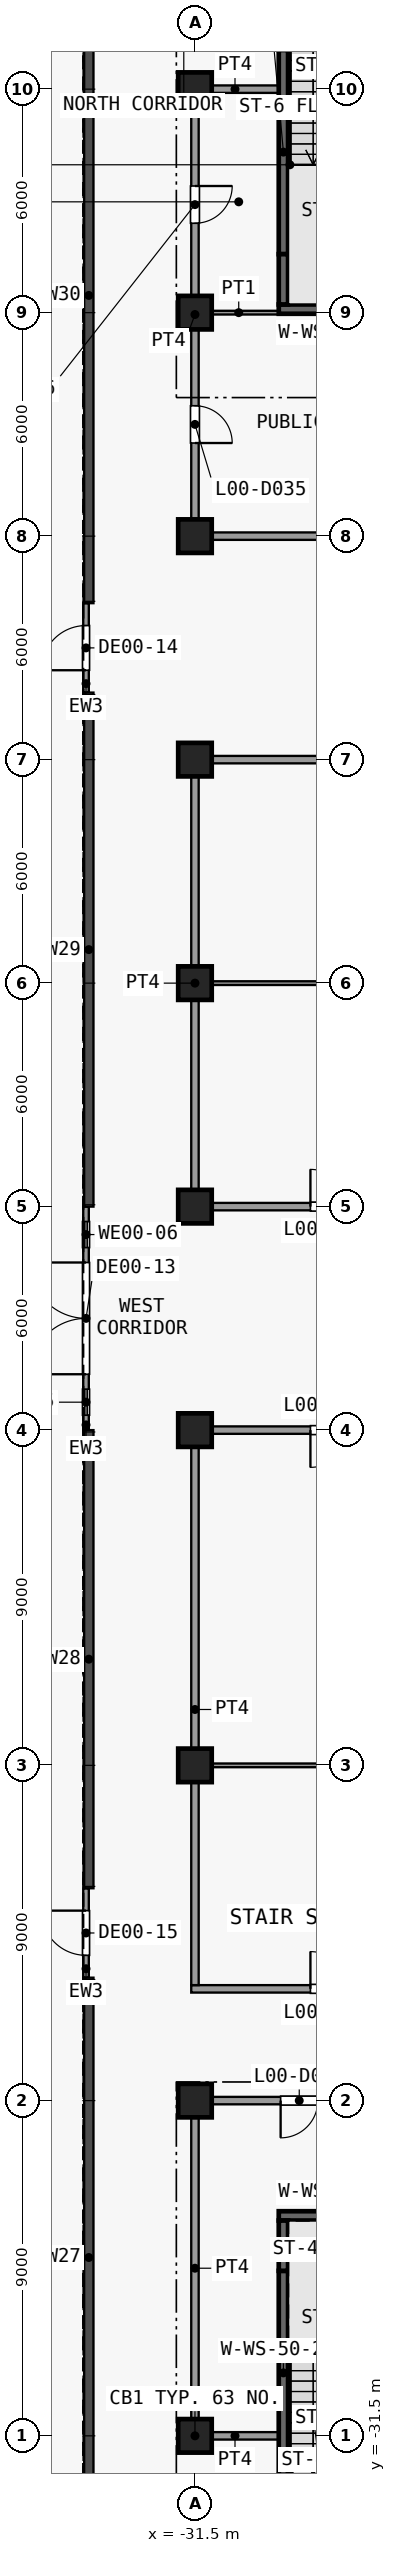
"""IFC4 building model, lengths in metres.
Left out: names, types, materials, properties, quantities, classifications, styles, units other than length and angle.
Written with IfcOpenShell. Run it as: python <this file> out.ifc"""

import sys

from ifc_helpers import new_model, si_unit, direction, frame, frame_2d, origin, origin_2d, place, context, subcontext, project, spatial, rectangle, extrude, element, fill, save


model = new_model("IFC4")
c1 = context("Model", 3, precision=1e-05, world=origin(), true_north=direction((0.0, 1.0)))
c2 = subcontext(c1, "Body", "Model", "MODEL_VIEW")
j1 = project(units=[si_unit("LENGTHUNIT", "METRE"), si_unit("PLANEANGLEUNIT", "RADIAN")], contexts=[c1])
p1 = place(None, origin())
s1 = spatial("IfcSite", under=j1, at=p1, CompositionType="ELEMENT")
p2 = place(p1, origin())
s2 = spatial("IfcBuilding", under=s1, at=p2, CompositionType="ELEMENT")
p3 = place(p2, origin())
s3 = spatial("IfcBuildingStorey", under=s2, at=p3, CompositionType="ELEMENT", Elevation=0.0)
for number, where, z_axis, x_axis in (
    (1, (-31.5, -31.5, 0.0), (0.0, 0.0, 1.0), (1.0, 0.0, 0.0)),
    (2, (-31.5, -22.5, 0.0), (0.0, 0.0, 1.0), (1.0, 0.0, 0.0)),
    (3, (-31.5, -13.5, 0.0), (0.0, 0.0, 1.0), (1.0, 0.0, 0.0)),
    (4, (-31.5, -4.5, 0.0), (0.0, 0.0, 1.0), (1.0, 0.0, 0.0)),
    (5, (-31.5, 1.5, 0.0), (0.0, 0.0, 1.0), (1.0, 0.0, 0.0)),
    (6, (-31.5, 7.5, 0.0), (0.0, 0.0, 1.0), (1.0, 0.0, 0.0)),
    (7, (-31.5, 13.5, 0.0), (0.0, 0.0, 1.0), (1.0, 0.0, 0.0)),
    (8, (-31.5, 19.5, 0.0), (0.0, 0.0, 1.0), (1.0, 0.0, 0.0)),
    (9, (-31.5, 25.5, 0.0), (0.0, 0.0, 1.0), (1.0, 0.0, 0.0)),
    (10, (-31.5, 31.5, 0.0), (0.0, 0.0, 1.0), (1.0, 0.0, 0.0)),
):
    element("IfcColumn", number, at=place(p3, frame(where, z_axis=z_axis, x_axis=x_axis)), inside=s3, PredefinedType="COLUMN", context=c2, shape_type="SweptSolid", body=[
        extrude(rectangle(XDim=0.9, YDim=0.9, at=origin_2d()), origin(), (0.0, 0.0, 1.0), 8.0),
    ])
p4 = place(p3, frame((-34.425, -4.5, 0.0), z_axis=(0.0, 0.0, 1.0), x_axis=(0.0, 1.0, 0.0)))
e11 = element("IfcWall", 11, at=p4, inside=s3, PredefinedType="SOLIDWALL", context=c2, shape_type="SweptSolid", body=[
    extrude(rectangle(XDim=6.0, YDim=0.15, at=frame_2d((3.0, 0.0))), origin(), (0.0, 0.0, 1.0), 7.65),
])
p5 = place(p4, frame((1.5, 0.0, 0.0)))
e12 = element("IfcOpeningElement", 12, at=p5, cuts=e11, PredefinedType="OPENING", context=c2, shape_type="SweptSolid", body=[
    extrude(rectangle(XDim=3.0, YDim=3.6, at=frame_2d((1.5, 1.8))), frame((0.0, 0.085, 0.0), z_axis=(0.0, -1.0, 0.0), x_axis=(1.0, 0.0, 0.0)), (0.0, 0.0, 1.0), 0.17),
])
p6 = place(p4, frame((0.4, 0.0, 0.0)))
e13 = element("IfcOpeningElement", 13, at=p6, cuts=e11, PredefinedType="OPENING", context=c2, shape_type="SweptSolid", body=[
    extrude(rectangle(XDim=0.7, YDim=5.0, at=frame_2d((0.35, 2.5))), frame((0.0, 0.085, 0.0), z_axis=(0.0, -1.0, 0.0), x_axis=(1.0, 0.0, 0.0)), (0.0, 0.0, 1.0), 0.17),
])
p7 = place(p4, frame((4.9, 0.0, 0.0)))
e14 = element("IfcOpeningElement", 14, at=p7, cuts=e11, PredefinedType="OPENING", context=c2, shape_type="SweptSolid", body=[
    extrude(rectangle(XDim=0.7, YDim=5.0, at=frame_2d((0.35, 2.5))), frame((0.0, 0.085, 0.0), z_axis=(0.0, -1.0, 0.0), x_axis=(1.0, 0.0, 0.0)), (0.0, 0.0, 1.0), 0.17),
])
p8 = place(p3, frame((-34.425, 15.3, 0.0), z_axis=(0.0, 0.0, 1.0), x_axis=(0.0, 1.0, 0.0)))
e15 = element("IfcWall", 15, at=p8, inside=s3, PredefinedType="SOLIDWALL", context=c2, shape_type="SweptSolid", body=[
    extrude(rectangle(XDim=2.4, YDim=0.15, at=frame_2d((1.2, 0.0))), origin(), (0.0, 0.0, 1.0), 7.65),
])
p9 = place(p8, frame((0.6, 0.0, 0.0)))
e16 = element("IfcOpeningElement", 16, at=p9, cuts=e15, PredefinedType="OPENING", context=c2, shape_type="SweptSolid", body=[
    extrude(rectangle(XDim=1.2, YDim=2.4, at=frame_2d((0.6, 1.2))), frame((0.0, 0.085, 0.0), z_axis=(0.0, -1.0, 0.0), x_axis=(1.0, 0.0, 0.0)), (0.0, 0.0, 1.0), 0.17),
])
p10 = place(p3, frame((-34.425, -19.2, 0.0), z_axis=(0.0, 0.0, 1.0), x_axis=(0.0, 1.0, 0.0)))
e17 = element("IfcWall", 17, at=p10, inside=s3, PredefinedType="SOLIDWALL", context=c2, shape_type="SweptSolid", body=[
    extrude(rectangle(XDim=2.4, YDim=0.15, at=frame_2d((1.2, 0.0))), origin(), (0.0, 0.0, 1.0), 7.65),
])
p11 = place(p10, frame((0.6, 0.0, 0.0)))
e18 = element("IfcOpeningElement", 18, at=p11, cuts=e17, PredefinedType="OPENING", context=c2, shape_type="SweptSolid", body=[
    extrude(rectangle(XDim=1.2, YDim=2.4, at=frame_2d((0.6, 1.2))), frame((0.0, 0.085, 0.0), z_axis=(0.0, -1.0, 0.0), x_axis=(1.0, 0.0, 0.0)), (0.0, 0.0, 1.0), 0.17),
])
p12 = place(p3, frame((-29.125, -32.55, 0.0), z_axis=(0.0, 0.0, 1.0), x_axis=(0.0, 1.0, 0.0)))
e19 = element("IfcWall", 19, at=p12, inside=s3, PredefinedType="SHEAR", context=c2, shape_type="SweptSolid", body=[
    extrude(rectangle(XDim=5.48, YDim=0.25, at=frame_2d((2.74, 0.0))), origin(), (0.0, 0.0, 1.0), 7.65),
])
p13 = place(p3, frame((-29.125, -27.07, 0.0), z_axis=(0.0, 0.0, 1.0), x_axis=(0.0, 1.0, 0.0)))
e20 = element("IfcWall", 20, at=p13, inside=s3, PredefinedType="SHEAR", context=c2, shape_type="SweptSolid", body=[
    extrude(rectangle(XDim=1.35, YDim=0.25, at=frame_2d((0.675, 0.0))), origin(), (0.0, 0.0, 1.0), 7.65),
])
p14 = place(p3, frame((-29.25, -25.595, 0.0), z_axis=(0.0, 0.0, 1.0), x_axis=(1.0, 0.0, 0.0)))
e21 = element("IfcWall", 21, at=p14, inside=s3, PredefinedType="SHEAR", context=c2, shape_type="SweptSolid", body=[
    extrude(rectangle(XDim=3.35, YDim=0.25, at=frame_2d((1.675, 0.0))), origin(), (0.0, 0.0, 1.0), 7.65),
])
p15 = place(p3, frame((-29.125, 27.07, 0.0), z_axis=(0.0, 0.0, 1.0), x_axis=(0.0, 1.0, 0.0)))
e22 = element("IfcWall", 22, at=p15, inside=s3, PredefinedType="SHEAR", context=c2, shape_type="SweptSolid", body=[
    extrude(rectangle(XDim=5.48, YDim=0.25, at=frame_2d((2.74, 0.0))), origin(), (0.0, 0.0, 1.0), 7.65),
])
p16 = place(p3, frame((-29.125, 25.72, 0.0), z_axis=(0.0, 0.0, 1.0), x_axis=(0.0, 1.0, 0.0)))
e23 = element("IfcWall", 23, at=p16, inside=s3, PredefinedType="SHEAR", context=c2, shape_type="SweptSolid", body=[
    extrude(rectangle(XDim=1.35, YDim=0.25, at=frame_2d((0.675, 0.0))), origin(), (0.0, 0.0, 1.0), 7.65),
])
p17 = place(p3, frame((-29.25, 25.595, 0.0), z_axis=(0.0, 0.0, 1.0), x_axis=(1.0, 0.0, 0.0)))
e24 = element("IfcWall", 24, at=p17, inside=s3, PredefinedType="SHEAR", context=c2, shape_type="SweptSolid", body=[
    extrude(rectangle(XDim=3.35, YDim=0.25, at=frame_2d((1.675, 0.0))), origin(), (0.0, 0.0, 1.0), 7.65),
])
p18 = place(p3, frame((-31.6, -31.5, 0.0), z_axis=(0.0, 0.0, 1.0), x_axis=(1.0, 0.0, 0.0)))
e25 = element("IfcWall", 25, at=p18, inside=s3, PredefinedType="PARTITIONING", context=c2, shape_type="SweptSolid", body=[
    extrude(rectangle(XDim=2.35, YDim=0.2, at=frame_2d((1.175, 0.0))), origin(), (0.0, 0.0, 1.0), 7.65),
])
p19 = place(p3, frame((-31.6, -22.5, 0.0), z_axis=(0.0, 0.0, 1.0), x_axis=(1.0, 0.0, 0.0)))
e26 = element("IfcWall", 26, at=p19, inside=s3, PredefinedType="PARTITIONING", context=c2, shape_type="SweptSolid", body=[
    extrude(rectangle(XDim=14.2, YDim=0.2, at=frame_2d((7.1, 0.0))), origin(), (0.0, 0.0, 1.0), 7.65),
])
p20 = place(p19, frame((2.4, 0.0, 0.0)))
e27 = element("IfcOpeningElement", 27, at=p20, cuts=e26, PredefinedType="OPENING", context=c2, shape_type="SweptSolid", body=[
    extrude(rectangle(XDim=1.0, YDim=2.1, at=frame_2d((0.5, 1.05))), frame((0.0, 0.11, 0.0), z_axis=(0.0, -1.0, 0.0), x_axis=(1.0, 0.0, 0.0)), (0.0, 0.0, 1.0), 0.22),
])
p21 = place(p19, frame((10.8, 0.0, 0.0)))
e28 = element("IfcOpeningElement", 28, at=p21, cuts=e26, PredefinedType="OPENING", context=c2, shape_type="SweptSolid", body=[
    extrude(rectangle(XDim=1.0, YDim=2.1, at=frame_2d((0.5, 1.05))), frame((0.0, 0.11, 0.0), z_axis=(0.0, -1.0, 0.0), x_axis=(1.0, 0.0, 0.0)), (0.0, 0.0, 1.0), 0.22),
])
p22 = place(p3, frame((-31.6, -19.5, 0.0), z_axis=(0.0, 0.0, 1.0), x_axis=(1.0, 0.0, 0.0)))
e29 = element("IfcWall", 29, at=p22, inside=s3, PredefinedType="PARTITIONING", context=c2, shape_type="SweptSolid", body=[
    extrude(rectangle(XDim=18.1, YDim=0.2, at=frame_2d((9.05, 0.0))), origin(), (0.0, 0.0, 1.0), 7.65),
])
p23 = place(p22, frame((3.2, 0.0, 0.0)))
e30 = element("IfcOpeningElement", 30, at=p23, cuts=e29, PredefinedType="OPENING", context=c2, shape_type="SweptSolid", body=[
    extrude(rectangle(XDim=1.0, YDim=2.1, at=frame_2d((0.5, 1.05))), frame((0.0, 0.11, 0.0), z_axis=(0.0, -1.0, 0.0), x_axis=(1.0, 0.0, 0.0)), (0.0, 0.0, 1.0), 0.22),
])
p24 = place(p22, frame((14.0, 0.0, 0.0)))
e31 = element("IfcOpeningElement", 31, at=p24, cuts=e29, PredefinedType="OPENING", context=c2, shape_type="SweptSolid", body=[
    extrude(rectangle(XDim=1.0, YDim=2.1, at=frame_2d((0.5, 1.05))), frame((0.0, 0.11, 0.0), z_axis=(0.0, -1.0, 0.0), x_axis=(1.0, 0.0, 0.0)), (0.0, 0.0, 1.0), 0.22),
])
p25 = place(p3, frame((-31.4, -13.5, 0.0), z_axis=(0.0, 0.0, 1.0), x_axis=(1.0, 0.0, 0.0)))
e32 = element("IfcWall", 32, at=p25, inside=s3, PredefinedType="PARTITIONING", context=c2, shape_type="SweptSolid", body=[
    extrude(rectangle(XDim=17.9, YDim=0.1, at=frame_2d((8.95, 0.0))), origin(), (0.0, 0.0, 1.0), 7.65),
])
p26 = place(p3, frame((-31.6, -4.5, 0.0), z_axis=(0.0, 0.0, 1.0), x_axis=(1.0, 0.0, 0.0)))
e33 = element("IfcWall", 33, at=p26, inside=s3, PredefinedType="PARTITIONING", context=c2, shape_type="SweptSolid", body=[
    extrude(rectangle(XDim=18.2, YDim=0.2, at=frame_2d((9.1, 0.0))), origin(), (0.0, 0.0, 1.0), 7.65),
])
p27 = place(p26, frame((3.2, 0.0, 0.0)))
e34 = element("IfcOpeningElement", 34, at=p27, cuts=e33, PredefinedType="OPENING", context=c2, shape_type="SweptSolid", body=[
    extrude(rectangle(XDim=1.0, YDim=2.1, at=frame_2d((0.5, 1.05))), frame((0.0, 0.11, 0.0), z_axis=(0.0, -1.0, 0.0), x_axis=(1.0, 0.0, 0.0)), (0.0, 0.0, 1.0), 0.22),
])
p28 = place(p26, frame((13.2, 0.0, 0.0)))
e35 = element("IfcOpeningElement", 35, at=p28, cuts=e33, PredefinedType="OPENING", context=c2, shape_type="SweptSolid", body=[
    extrude(rectangle(XDim=1.0, YDim=2.1, at=frame_2d((0.5, 1.05))), frame((0.0, 0.11, 0.0), z_axis=(0.0, -1.0, 0.0), x_axis=(1.0, 0.0, 0.0)), (0.0, 0.0, 1.0), 0.22),
])
p29 = place(p3, frame((-31.6, 1.5, 0.0), z_axis=(0.0, 0.0, 1.0), x_axis=(1.0, 0.0, 0.0)))
e36 = element("IfcWall", 36, at=p29, inside=s3, PredefinedType="PARTITIONING", context=c2, shape_type="SweptSolid", body=[
    extrude(rectangle(XDim=36.1, YDim=0.2, at=frame_2d((18.05, 0.0))), origin(), (0.0, 0.0, 1.0), 7.65),
])
p30 = place(p29, frame((3.2, 0.0, 0.0)))
e37 = element("IfcOpeningElement", 37, at=p30, cuts=e36, PredefinedType="OPENING", context=c2, shape_type="SweptSolid", body=[
    extrude(rectangle(XDim=1.0, YDim=2.1, at=frame_2d((0.5, 1.05))), frame((0.0, 0.11, 0.0), z_axis=(0.0, -1.0, 0.0), x_axis=(1.0, 0.0, 0.0)), (0.0, 0.0, 1.0), 0.22),
])
p31 = place(p29, frame((13.2, 0.0, 0.0)))
e38 = element("IfcOpeningElement", 38, at=p31, cuts=e36, PredefinedType="OPENING", context=c2, shape_type="SweptSolid", body=[
    extrude(rectangle(XDim=1.0, YDim=2.1, at=frame_2d((0.5, 1.05))), frame((0.0, 0.11, 0.0), z_axis=(0.0, -1.0, 0.0), x_axis=(1.0, 0.0, 0.0)), (0.0, 0.0, 1.0), 0.22),
])
p32 = place(p3, frame((-31.4, 7.5, 0.0), z_axis=(0.0, 0.0, 1.0), x_axis=(1.0, 0.0, 0.0)))
e39 = element("IfcWall", 39, at=p32, inside=s3, PredefinedType="PARTITIONING", context=c2, shape_type="SweptSolid", body=[
    extrude(rectangle(XDim=35.9, YDim=0.1, at=frame_2d((17.95, 0.0))), origin(), (0.0, 0.0, 1.0), 7.65),
])
p33 = place(p3, frame((-31.6, 13.5, 0.0), z_axis=(0.0, 0.0, 1.0), x_axis=(1.0, 0.0, 0.0)))
e40 = element("IfcWall", 40, at=p33, inside=s3, PredefinedType="PARTITIONING", context=c2, shape_type="SweptSolid", body=[
    extrude(rectangle(XDim=54.75, YDim=0.2, at=frame_2d((27.375, 0.0))), origin(), (0.0, 0.0, 1.0), 7.65),
])
p34 = place(p33, frame((7.2, 0.0, 0.0)))
e41 = element("IfcOpeningElement", 41, at=p34, cuts=e40, PredefinedType="OPENING", context=c2, shape_type="SweptSolid", body=[
    extrude(rectangle(XDim=1.0, YDim=2.1, at=frame_2d((0.5, 1.05))), frame((0.0, 0.11, 0.0), z_axis=(0.0, -1.0, 0.0), x_axis=(1.0, 0.0, 0.0)), (0.0, 0.0, 1.0), 0.22),
])
p35 = place(p33, frame((34.2, 0.0, 0.0)))
e42 = element("IfcOpeningElement", 42, at=p35, cuts=e40, PredefinedType="OPENING", context=c2, shape_type="SweptSolid", body=[
    extrude(rectangle(XDim=1.0, YDim=2.1, at=frame_2d((0.5, 1.05))), frame((0.0, 0.11, 0.0), z_axis=(0.0, -1.0, 0.0), x_axis=(1.0, 0.0, 0.0)), (0.0, 0.0, 1.0), 0.22),
])
p36 = place(p33, frame((45.3, 0.0, 0.0)))
e43 = element("IfcOpeningElement", 43, at=p36, cuts=e40, PredefinedType="OPENING", context=c2, shape_type="SweptSolid", body=[
    extrude(rectangle(XDim=1.0, YDim=2.1, at=frame_2d((0.5, 1.05))), frame((0.0, 0.11, 0.0), z_axis=(0.0, -1.0, 0.0), x_axis=(1.0, 0.0, 0.0)), (0.0, 0.0, 1.0), 0.22),
])
p37 = place(p33, frame((52.0, 0.0, 0.0)))
e44 = element("IfcOpeningElement", 44, at=p37, cuts=e40, PredefinedType="OPENING", context=c2, shape_type="SweptSolid", body=[
    extrude(rectangle(XDim=1.0, YDim=2.1, at=frame_2d((0.5, 1.05))), frame((0.0, 0.11, 0.0), z_axis=(0.0, -1.0, 0.0), x_axis=(1.0, 0.0, 0.0)), (0.0, 0.0, 1.0), 0.22),
])
p38 = place(p3, frame((-31.6, 19.5, 0.0), z_axis=(0.0, 0.0, 1.0), x_axis=(1.0, 0.0, 0.0)))
e45 = element("IfcWall", 45, at=p38, inside=s3, PredefinedType="PARTITIONING", context=c2, shape_type="SweptSolid", body=[
    extrude(rectangle(XDim=54.75, YDim=0.2, at=frame_2d((27.375, 0.0))), origin(), (0.0, 0.0, 1.0), 7.65),
])
p39 = place(p38, frame((7.2, 0.0, 0.0)))
e46 = element("IfcOpeningElement", 46, at=p39, cuts=e45, PredefinedType="OPENING", context=c2, shape_type="SweptSolid", body=[
    extrude(rectangle(XDim=1.0, YDim=2.1, at=frame_2d((0.5, 1.05))), frame((0.0, 0.11, 0.0), z_axis=(0.0, -1.0, 0.0), x_axis=(1.0, 0.0, 0.0)), (0.0, 0.0, 1.0), 0.22),
])
p40 = place(p38, frame((16.0, 0.0, 0.0)))
e47 = element("IfcOpeningElement", 47, at=p40, cuts=e45, PredefinedType="OPENING", context=c2, shape_type="SweptSolid", body=[
    extrude(rectangle(XDim=1.0, YDim=2.1, at=frame_2d((0.5, 1.05))), frame((0.0, 0.11, 0.0), z_axis=(0.0, -1.0, 0.0), x_axis=(1.0, 0.0, 0.0)), (0.0, 0.0, 1.0), 0.22),
])
p41 = place(p38, frame((32.5, 0.0, 0.0)))
e48 = element("IfcOpeningElement", 48, at=p41, cuts=e45, PredefinedType="OPENING", context=c2, shape_type="SweptSolid", body=[
    extrude(rectangle(XDim=1.0, YDim=2.1, at=frame_2d((0.5, 1.05))), frame((0.0, 0.11, 0.0), z_axis=(0.0, -1.0, 0.0), x_axis=(1.0, 0.0, 0.0)), (0.0, 0.0, 1.0), 0.22),
])
p42 = place(p38, frame((46.2, 0.0, 0.0)))
e49 = element("IfcOpeningElement", 49, at=p42, cuts=e45, PredefinedType="OPENING", context=c2, shape_type="SweptSolid", body=[
    extrude(rectangle(XDim=1.0, YDim=2.1, at=frame_2d((0.5, 1.05))), frame((0.0, 0.11, 0.0), z_axis=(0.0, -1.0, 0.0), x_axis=(1.0, 0.0, 0.0)), (0.0, 0.0, 1.0), 0.22),
])
p43 = place(p3, frame((-31.4, 25.5, 0.0), z_axis=(0.0, 0.0, 1.0), x_axis=(1.0, 0.0, 0.0)))
e50 = element("IfcWall", 50, at=p43, inside=s3, PredefinedType="PARTITIONING", context=c2, shape_type="SweptSolid", body=[
    extrude(rectangle(XDim=2.15, YDim=0.1, at=frame_2d((1.075, 0.0))), origin(), (0.0, 0.0, 1.0), 7.65),
])
p44 = place(p3, frame((-31.6, 31.5, 0.0), z_axis=(0.0, 0.0, 1.0), x_axis=(1.0, 0.0, 0.0)))
e51 = element("IfcWall", 51, at=p44, inside=s3, PredefinedType="PARTITIONING", context=c2, shape_type="SweptSolid", body=[
    extrude(rectangle(XDim=2.35, YDim=0.2, at=frame_2d((1.175, 0.0))), origin(), (0.0, 0.0, 1.0), 7.65),
])
p45 = place(p3, frame((-31.5, -31.4, 0.0), z_axis=(0.0, 0.0, 1.0), x_axis=(0.0, 1.0, 0.0)))
e52 = element("IfcWall", 52, at=p45, inside=s3, PredefinedType="PARTITIONING", context=c2, shape_type="SweptSolid", body=[
    extrude(rectangle(XDim=8.8, YDim=0.2, at=frame_2d((4.4, 0.0))), origin(), (0.0, 0.0, 1.0), 7.65),
])
p46 = place(p3, frame((-31.5, -19.4, 0.0), z_axis=(0.0, 0.0, 1.0), x_axis=(0.0, 1.0, 0.0)))
e53 = element("IfcWall", 53, at=p46, inside=s3, PredefinedType="PARTITIONING", context=c2, shape_type="SweptSolid", body=[
    extrude(rectangle(XDim=14.8, YDim=0.2, at=frame_2d((7.4, 0.0))), origin(), (0.0, 0.0, 1.0), 7.65),
])
p47 = place(p3, frame((-31.5, 1.6, 0.0), z_axis=(0.0, 0.0, 1.0), x_axis=(0.0, 1.0, 0.0)))
e54 = element("IfcWall", 54, at=p47, inside=s3, PredefinedType="PARTITIONING", context=c2, shape_type="SweptSolid", body=[
    extrude(rectangle(XDim=11.8, YDim=0.2, at=frame_2d((5.9, 0.0))), origin(), (0.0, 0.0, 1.0), 7.65),
])
p48 = place(p3, frame((-31.5, 19.6, 0.0), z_axis=(0.0, 0.0, 1.0), x_axis=(0.0, 1.0, 0.0)))
e55 = element("IfcWall", 55, at=p48, inside=s3, PredefinedType="PARTITIONING", context=c2, shape_type="SweptSolid", body=[
    extrude(rectangle(XDim=11.8, YDim=0.2, at=frame_2d((5.9, 0.0))), origin(), (0.0, 0.0, 1.0), 7.65),
])
p49 = place(p48, frame((2.4, 0.0, 0.0)))
e56 = element("IfcOpeningElement", 56, at=p49, cuts=e55, PredefinedType="OPENING", context=c2, shape_type="SweptSolid", body=[
    extrude(rectangle(XDim=1.0, YDim=2.1, at=frame_2d((0.5, 1.05))), frame((0.0, 0.11, 0.0), z_axis=(0.0, -1.0, 0.0), x_axis=(1.0, 0.0, 0.0)), (0.0, 0.0, 1.0), 0.22),
])
p50 = place(p48, frame((8.3, 0.0, 0.0)))
e57 = element("IfcOpeningElement", 57, at=p50, cuts=e55, PredefinedType="OPENING", context=c2, shape_type="SweptSolid", body=[
    extrude(rectangle(XDim=1.0, YDim=2.1, at=frame_2d((0.5, 1.05))), frame((0.0, 0.11, 0.0), z_axis=(0.0, -1.0, 0.0), x_axis=(1.0, 0.0, 0.0)), (0.0, 0.0, 1.0), 0.22),
])
p51 = place(p5, origin())
e58 = element("IfcDoor", 58, at=p51, inside=s3, OperationType="DOUBLE_DOOR_SINGLE_SWING", PredefinedType="DOOR", context=c2, shape_type="SweptSolid", body=[
    extrude(rectangle(XDim=3.0, YDim=3.6, at=frame_2d((1.5, 1.8))), frame((0.0, 0.025, 0.0), z_axis=(0.0, -1.0, 0.0), x_axis=(1.0, 0.0, 0.0)), (0.0, 0.0, 1.0), 0.05),
])
fill(e12, e58)
p52 = place(p6, origin())
e59 = element("IfcWindow", 59, at=p52, inside=s3, PartitioningType="SINGLE_PANEL", PredefinedType="WINDOW", context=c2, shape_type="SweptSolid", body=[
    extrude(rectangle(XDim=0.7, YDim=5.0, at=frame_2d((0.35, 2.5))), frame((0.0, 0.03, 0.0), z_axis=(0.0, -1.0, 0.0), x_axis=(1.0, 0.0, 0.0)), (0.0, 0.0, 1.0), 0.06),
])
fill(e13, e59)
p53 = place(p7, origin())
e60 = element("IfcWindow", 60, at=p53, inside=s3, PartitioningType="SINGLE_PANEL", PredefinedType="WINDOW", context=c2, shape_type="SweptSolid", body=[
    extrude(rectangle(XDim=0.7, YDim=5.0, at=frame_2d((0.35, 2.5))), frame((0.0, 0.03, 0.0), z_axis=(0.0, -1.0, 0.0), x_axis=(1.0, 0.0, 0.0)), (0.0, 0.0, 1.0), 0.06),
])
fill(e14, e60)
p54 = place(p9, origin())
e61 = element("IfcDoor", 61, at=p54, inside=s3, OperationType="SINGLE_SWING_LEFT", PredefinedType="DOOR", context=c2, shape_type="SweptSolid", body=[
    extrude(rectangle(XDim=1.2, YDim=2.4, at=frame_2d((0.6, 1.2))), frame((0.0, 0.025, 0.0), z_axis=(0.0, -1.0, 0.0), x_axis=(1.0, 0.0, 0.0)), (0.0, 0.0, 1.0), 0.05),
])
fill(e16, e61)
p55 = place(p11, origin())
e62 = element("IfcDoor", 62, at=p55, inside=s3, OperationType="SINGLE_SWING_RIGHT", PredefinedType="DOOR", context=c2, shape_type="SweptSolid", body=[
    extrude(rectangle(XDim=1.2, YDim=2.4, at=frame_2d((0.6, 1.2))), frame((0.0, 0.025, 0.0), z_axis=(0.0, -1.0, 0.0), x_axis=(1.0, 0.0, 0.0)), (0.0, 0.0, 1.0), 0.05),
])
fill(e18, e62)
p56 = place(p20, origin())
e63 = element("IfcDoor", 63, at=p56, inside=s3, OperationType="SINGLE_SWING_LEFT", PredefinedType="DOOR", context=c2, shape_type="SweptSolid", body=[
    extrude(rectangle(XDim=1.0, YDim=2.1, at=frame_2d((0.5, 1.05))), frame((0.0, 0.025, 0.0), z_axis=(0.0, -1.0, 0.0), x_axis=(1.0, 0.0, 0.0)), (0.0, 0.0, 1.0), 0.05),
])
fill(e27, e63)
p57 = place(p23, origin())
e64 = element("IfcDoor", 64, at=p57, inside=s3, OperationType="SINGLE_SWING_RIGHT", PredefinedType="DOOR", context=c2, shape_type="SweptSolid", body=[
    extrude(rectangle(XDim=1.0, YDim=2.1, at=frame_2d((0.5, 1.05))), frame((0.0, 0.025, 0.0), z_axis=(0.0, -1.0, 0.0), x_axis=(1.0, 0.0, 0.0)), (0.0, 0.0, 1.0), 0.05),
])
fill(e30, e64)
p58 = place(p27, origin())
e65 = element("IfcDoor", 65, at=p58, inside=s3, OperationType="SINGLE_SWING_LEFT", PredefinedType="DOOR", context=c2, shape_type="SweptSolid", body=[
    extrude(rectangle(XDim=1.0, YDim=2.1, at=frame_2d((0.5, 1.05))), frame((0.0, 0.025, 0.0), z_axis=(0.0, -1.0, 0.0), x_axis=(1.0, 0.0, 0.0)), (0.0, 0.0, 1.0), 0.05),
])
fill(e34, e65)
p59 = place(p30, origin())
e66 = element("IfcDoor", 66, at=p59, inside=s3, OperationType="SINGLE_SWING_RIGHT", PredefinedType="DOOR", context=c2, shape_type="SweptSolid", body=[
    extrude(rectangle(XDim=1.0, YDim=2.1, at=frame_2d((0.5, 1.05))), frame((0.0, 0.025, 0.0), z_axis=(0.0, -1.0, 0.0), x_axis=(1.0, 0.0, 0.0)), (0.0, 0.0, 1.0), 0.05),
])
fill(e37, e66)
p60 = place(p49, origin())
e67 = element("IfcDoor", 67, at=p60, inside=s3, OperationType="SINGLE_SWING_LEFT", PredefinedType="DOOR", context=c2, shape_type="SweptSolid", body=[
    extrude(rectangle(XDim=1.0, YDim=2.1, at=frame_2d((0.5, 1.05))), frame((0.0, 0.025, 0.0), z_axis=(0.0, -1.0, 0.0), x_axis=(1.0, 0.0, 0.0)), (0.0, 0.0, 1.0), 0.05),
])
fill(e56, e67)
p61 = place(p50, origin())
e68 = element("IfcDoor", 68, at=p61, inside=s3, OperationType="SINGLE_SWING_RIGHT", PredefinedType="DOOR", context=c2, shape_type="SweptSolid", body=[
    extrude(rectangle(XDim=1.0, YDim=2.1, at=frame_2d((0.5, 1.05))), frame((0.0, 0.025, 0.0), z_axis=(0.0, -1.0, 0.0), x_axis=(1.0, 0.0, 0.0)), (0.0, 0.0, 1.0), 0.05),
])
fill(e57, e68)
save(model, sys.argv[1])
